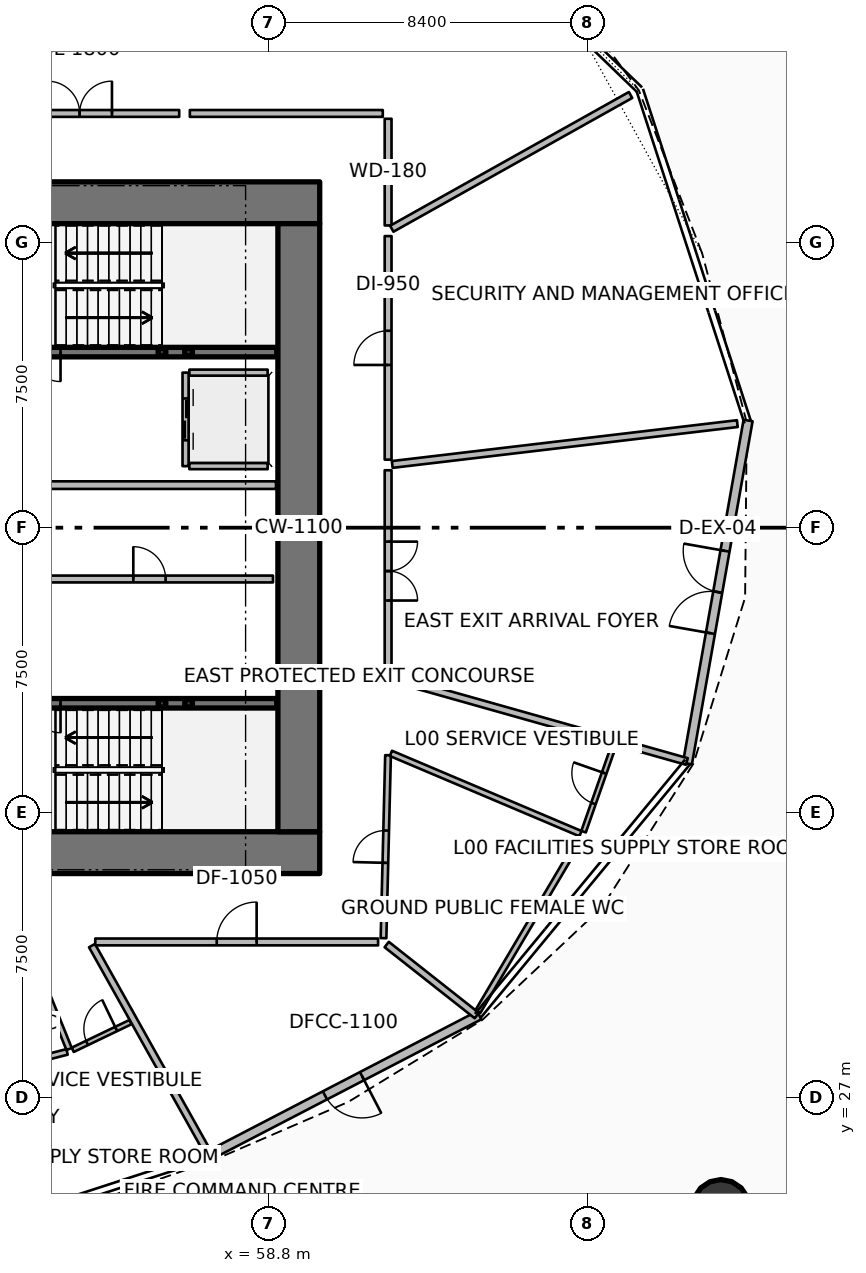
"""IFC4 building model, lengths in metres.
Left out: names, types, materials, properties, quantities, classifications, styles, units other than length and angle.
Written with IfcOpenShell. Run it as: python <this file> out.ifc"""

import sys

from ifc_helpers import new_model, si_unit, direction, frame, frame_2d, origin, origin_2d, place, context, subcontext, project, spatial, rectangle, hollow_rectangle, circle, extrude, element, fill, save


model = new_model("IFC4")
c1 = context("Model", 3, precision=1e-05, world=origin(), true_north=direction((0.0, 1.0)))
c2 = subcontext(c1, "Body", "Model", "MODEL_VIEW")
j1 = project(units=[si_unit("LENGTHUNIT", "METRE"), si_unit("PLANEANGLEUNIT", "RADIAN")], contexts=[c1])
p1 = place(None, origin())
s1 = spatial("IfcSite", under=j1, at=p1, CompositionType="ELEMENT")
p2 = place(p1, origin())
s2 = spatial("IfcBuilding", under=s1, at=p2, CompositionType="ELEMENT")
p3 = place(p2, origin())
s3 = spatial("IfcBuildingStorey", under=s2, at=p3, CompositionType="ELEMENT", Elevation=0.0)
for number, where, z_axis, x_axis in (
    (1, (49.95, 33.45, 0.0), (0.0, 0.0, 1.0), (1.0, 0.0, 0.0)),
    (2, (49.95, 50.55, 0.0), (0.0, 0.0, 1.0), (1.0, 0.0, 0.0)),
):
    element("IfcWall", number, at=place(p3, frame(where, z_axis=z_axis, x_axis=x_axis)), inside=s3, PredefinedType="SHEAR", context=c2, shape_type="SweptSolid", body=[
        extrude(rectangle(XDim=10.2, YDim=1.1, at=frame_2d((5.1, 0.0))), origin(), (0.0, 0.0, 1.0), 7.2),
    ])
p4 = place(p3, frame((59.6, 34.0, 0.0), z_axis=(0.0, 0.0, 1.0), x_axis=(0.0, 1.0, 0.0)))
e3 = element("IfcWall", 3, at=p4, inside=s3, PredefinedType="SHEAR", context=c2, shape_type="SweptSolid", body=[
    extrude(rectangle(XDim=16.0, YDim=1.1, at=frame_2d((8.0, 0.0))), origin(), (0.0, 0.0, 1.0), 7.2),
])
p5 = place(p3, frame((56.0, 46.62, 0.0), z_axis=(0.0, 0.0, 1.0), x_axis=(1.0, 0.0, 0.0)))
e4 = element("IfcColumn", 4, at=p5, inside=s3, PredefinedType="COLUMN", context=c2, shape_type="SweptSolid", body=[
    extrude(hollow_rectangle(XDim=0.2, YDim=0.2, WallThickness=0.01, InnerFilletRadius=0.01, OuterFilletRadius=0.02, at=origin_2d()), origin(), (0.0, 0.0, 1.0), 1.595),
])
p6 = place(p3, frame((56.7, 46.62, 0.0), z_axis=(0.0, 0.0, 1.0), x_axis=(1.0, 0.0, 0.0)))
e5 = element("IfcColumn", 5, at=p6, inside=s3, PredefinedType="COLUMN", context=c2, shape_type="SweptSolid", body=[
    extrude(hollow_rectangle(XDim=0.2, YDim=0.2, WallThickness=0.01, InnerFilletRadius=0.01, OuterFilletRadius=0.02, at=origin_2d()), origin(), (0.0, 0.0, 1.0), 5.195),
])
p7 = place(p3, frame((56.0, 37.38, 0.0), z_axis=(0.0, 0.0, 1.0), x_axis=(1.0, 0.0, 0.0)))
e6 = element("IfcColumn", 6, at=p7, inside=s3, PredefinedType="COLUMN", context=c2, shape_type="SweptSolid", body=[
    extrude(hollow_rectangle(XDim=0.2, YDim=0.2, WallThickness=0.01, InnerFilletRadius=0.01, OuterFilletRadius=0.02, at=origin_2d()), origin(), (0.0, 0.0, 1.0), 1.595),
])
p8 = place(p3, frame((56.7, 37.38, 0.0), z_axis=(0.0, 0.0, 1.0), x_axis=(1.0, 0.0, 0.0)))
e7 = element("IfcColumn", 7, at=p8, inside=s3, PredefinedType="COLUMN", context=c2, shape_type="SweptSolid", body=[
    extrude(hollow_rectangle(XDim=0.2, YDim=0.2, WallThickness=0.01, InnerFilletRadius=0.01, OuterFilletRadius=0.02, at=origin_2d()), origin(), (0.0, 0.0, 1.0), 5.195),
])
p9 = place(p3, frame((70.709, 24.098, 0.0), z_axis=(0.0, 0.0, 1.0), x_axis=(1.0, 0.0, 0.0)))
e8 = element("IfcColumn", 8, at=p9, inside=s3, PredefinedType="COLUMN", context=c2, shape_type="SweptSolid", body=[
    extrude(circle(Radius=0.75, at=origin_2d()), origin(), (0.0, 0.0, 1.0), 6.8),
])
p10 = place(p3, frame((64.348, 29.17, 0.0), z_axis=(0.0, 0.0, 1.0), x_axis=(-0.887579557391, -0.460654457594, 0.0)))
e9 = element("IfcWall", 9, at=p10, inside=s3, PredefinedType="SOLIDWALL", context=c2, shape_type="SweptSolid", body=[
    extrude(rectangle(XDim=8.049, YDim=0.24, at=frame_2d((4.024, 0.0))), origin(), (0.0, 0.0, 1.0), 5.35),
])
p11 = place(p10, frame((3.474, 0.0, 0.0)))
e10 = element("IfcOpeningElement", 10, at=p11, cuts=e9, PredefinedType="OPENING", context=c2, shape_type="SweptSolid", body=[
    extrude(rectangle(XDim=1.1, YDim=2.2, at=frame_2d((0.55, 1.1))), frame((0.0, 0.13, 0.0), z_axis=(0.0, -1.0, 0.0), x_axis=(1.0, 0.0, 0.0)), (0.0, 0.0, 1.0), 0.26),
])
p12 = place(p3, frame((71.422, 44.82, 0.0), z_axis=(0.0, 0.0, 1.0), x_axis=(-0.174163599579, -0.984716731137, 0.0)))
e11 = element("IfcWall", 11, at=p12, inside=s3, PredefinedType="SOLIDWALL", context=c2, shape_type="SweptSolid", body=[
    extrude(rectangle(XDim=9.168, YDim=0.24, at=frame_2d((4.584, 0.0))), origin(), (0.0, 0.0, 1.0), 5.35),
])
p13 = place(p12, frame((3.484, 0.0, 0.0)))
e12 = element("IfcOpeningElement", 12, at=p13, cuts=e11, PredefinedType="OPENING", context=c2, shape_type="SweptSolid", body=[
    extrude(rectangle(XDim=2.2, YDim=2.4, at=frame_2d((1.1, 1.2))), frame((0.0, 0.13, 0.0), z_axis=(0.0, -1.0, 0.0), x_axis=(1.0, 0.0, 0.0)), (0.0, 0.0, 1.0), 0.26),
])
p14 = place(p3, frame((51.48, 46.62, 0.0), z_axis=(0.0, 0.0, 1.0), x_axis=(1.0, 0.0, 0.0)))
e13 = element("IfcWall", 13, at=p14, inside=s3, PredefinedType="SOLIDWALL", context=c2, shape_type="SweptSolid", body=[
    extrude(rectangle(XDim=7.54, YDim=0.25, at=frame_2d((3.77, 0.0))), origin(), (0.0, 0.0, 1.0), 6.8),
])
p15 = place(p14, frame((0.3, 0.0, 0.0)))
e14 = element("IfcOpeningElement", 14, at=p15, cuts=e13, PredefinedType="OPENING", context=c2, shape_type="SweptSolid", body=[
    extrude(rectangle(XDim=1.55, YDim=2.15, at=frame_2d((0.775, 1.075))), frame((0.0, 0.135, 0.0), z_axis=(0.0, -1.0, 0.0), x_axis=(1.0, 0.0, 0.0)), (0.0, 0.0, 1.0), 0.27),
])
p16 = place(p3, frame((51.48, 37.38, 0.0), z_axis=(0.0, 0.0, 1.0), x_axis=(1.0, 0.0, 0.0)))
e15 = element("IfcWall", 15, at=p16, inside=s3, PredefinedType="SOLIDWALL", context=c2, shape_type="SweptSolid", body=[
    extrude(rectangle(XDim=7.54, YDim=0.25, at=frame_2d((3.77, 0.0))), origin(), (0.0, 0.0, 1.0), 6.8),
])
p17 = place(p16, frame((0.3, 0.0, 0.0)))
e16 = element("IfcOpeningElement", 16, at=p17, cuts=e15, PredefinedType="OPENING", context=c2, shape_type="SweptSolid", body=[
    extrude(rectangle(XDim=1.55, YDim=2.15, at=frame_2d((0.775, 1.075))), frame((0.0, 0.135, 0.0), z_axis=(0.0, -1.0, 0.0), x_axis=(1.0, 0.0, 0.0)), (0.0, 0.0, 1.0), 0.27),
])
p18 = place(p3, frame((56.62, 46.08, 0.0), z_axis=(0.0, 0.0, 1.0), x_axis=(0.0, -1.0, 0.0)))
e17 = element("IfcWall", 17, at=p18, inside=s3, PredefinedType="PARTITIONING", context=c2, shape_type="SweptSolid", body=[
    extrude(rectangle(XDim=2.46, YDim=0.16, at=frame_2d((1.23, 0.0))), origin(), (0.0, 0.0, 1.0), 6.8),
])
p19 = place(p18, frame((0.68, 0.0, 0.0)))
e18 = element("IfcOpeningElement", 18, at=p19, cuts=e17, PredefinedType="OPENING", context=c2, shape_type="SweptSolid", body=[
    extrude(rectangle(XDim=1.1, YDim=2.1, at=frame_2d((0.55, 1.05))), frame((0.0, 0.09, 0.0), z_axis=(0.0, -1.0, 0.0), x_axis=(1.0, 0.0, 0.0)), (0.0, 0.0, 1.0), 0.18),
])
for number, where, z_axis, x_axis in (
    (19, (56.72, 46.08, 0.0), (0.0, 0.0, 1.0), (1.0, 0.0, 0.0)),
    (20, (56.72, 43.62, 0.0), (0.0, 0.0, 1.0), (1.0, 0.0, 0.0)),
):
    element("IfcWall", number, at=place(p3, frame(where, z_axis=z_axis, x_axis=x_axis)), inside=s3, PredefinedType="PARTITIONING", context=c2, shape_type="SweptSolid", body=[
        extrude(rectangle(XDim=2.06, YDim=0.16, at=frame_2d((1.03, 0.0))), origin(), (0.0, 0.0, 1.0), 6.8),
    ])
p20 = place(p3, frame((52.42, 40.65, 0.0), z_axis=(0.0, 0.0, 1.0), x_axis=(1.0, 0.0, 0.0)))
e21 = element("IfcWall", 21, at=p20, inside=s3, PredefinedType="PARTITIONING", context=c2, shape_type="SweptSolid", body=[
    extrude(rectangle(XDim=6.5, YDim=0.18, at=frame_2d((3.25, 0.0))), origin(), (0.0, 0.0, 1.0), 6.8),
])
p21 = place(p20, frame((2.825, 0.0, 0.0)))
e22 = element("IfcOpeningElement", 22, at=p21, cuts=e21, PredefinedType="OPENING", context=c2, shape_type="SweptSolid", body=[
    extrude(rectangle(XDim=0.85, YDim=2.06, at=frame_2d((0.425, 1.03))), frame((0.0, 0.1, 0.0), z_axis=(0.0, -1.0, 0.0), x_axis=(1.0, 0.0, 0.0)), (0.0, 0.0, 1.0), 0.2),
])
p22 = place(p3, frame((50.12, 43.12, 0.0), z_axis=(0.0, 0.0, 1.0), x_axis=(1.0, 0.0, 0.0)))
e23 = element("IfcWall", 23, at=p22, inside=s3, PredefinedType="PARTITIONING", context=c2, shape_type="SweptSolid", body=[
    extrude(rectangle(XDim=8.88, YDim=0.2, at=frame_2d((4.44, 0.0))), origin(), (0.0, 0.0, 1.0), 6.8),
])
p23 = place(p3, frame((61.95, 49.952, 0.0), z_axis=(0.0, 0.0, 1.0), x_axis=(0.0, 1.0, 0.0)))
e24 = element("IfcWall", 24, at=p23, inside=s3, PredefinedType="PARTITIONING", context=c2, shape_type="SweptSolid", body=[
    extrude(rectangle(XDim=2.808, YDim=0.18, at=frame_2d((1.404, 0.0))), origin(), (0.0, 0.0, 1.0), 5.375),
])
p24 = place(p3, frame((61.81, 52.9, 0.0), z_axis=(0.0, 0.0, 1.0), x_axis=(-1.0, 0.0, 0.0)))
e25 = element("IfcWall", 25, at=p24, inside=s3, PredefinedType="PARTITIONING", context=c2, shape_type="SweptSolid", body=[
    extrude(rectangle(XDim=5.077, YDim=0.18, at=frame_2d((2.539, 0.0))), origin(), (0.0, 0.0, 1.0), 5.375),
])
p25 = place(p3, frame((56.453, 52.9, 0.0), z_axis=(0.0, 0.0, 1.0), x_axis=(-1.0, 0.0, 0.0)))
e26 = element("IfcWall", 26, at=p25, inside=s3, PredefinedType="PARTITIONING", context=c2, shape_type="SweptSolid", body=[
    extrude(rectangle(XDim=5.239, YDim=0.18, at=frame_2d((2.619, 0.0))), origin(), (0.0, 0.0, 1.0), 5.375),
])
p26 = place(p25, frame((1.769, 0.0, 0.0)))
e27 = element("IfcOpeningElement", 27, at=p26, cuts=e26, PredefinedType="OPENING", context=c2, shape_type="SweptSolid", body=[
    extrude(rectangle(XDim=1.7, YDim=2.15, at=frame_2d((0.85, 1.075))), frame((0.0, 0.1, 0.0), z_axis=(0.0, -1.0, 0.0), x_axis=(1.0, 0.0, 0.0)), (0.0, 0.0, 1.0), 0.2),
])
p27 = place(p3, frame((62.046, 49.866, 0.0), z_axis=(0.0, 0.0, 1.0), x_axis=(0.872497345561, 0.488618851447, 0.0)))
e28 = element("IfcWall", 28, at=p27, inside=s3, PredefinedType="PARTITIONING", context=c2, shape_type="SweptSolid", body=[
    extrude(rectangle(XDim=7.203, YDim=0.18, at=frame_2d((3.601, 0.0))), origin(), (0.0, 0.0, 1.0), 5.375),
])
p28 = place(p3, frame((51.104, 53.006, 0.0), z_axis=(0.0, 0.0, 1.0), x_axis=(0.271432731122, 0.962457413331, 0.0)))
e29 = element("IfcWall", 29, at=p28, inside=s3, PredefinedType="PARTITIONING", context=c2, shape_type="SweptSolid", body=[
    extrude(rectangle(XDim=9.3, YDim=0.18, at=frame_2d((4.65, 0.0))), origin(), (0.0, 0.0, 1.0), 5.375),
])
p29 = place(p3, frame((52.445, 31.026, 0.0), z_axis=(0.0, 0.0, 1.0), x_axis=(0.375383430631, -0.926869613272, 0.0)))
e30 = element("IfcWall", 30, at=p29, inside=s3, PredefinedType="PARTITIONING", context=c2, shape_type="SweptSolid", body=[
    extrude(rectangle(XDim=2.96, YDim=0.15, at=frame_2d((1.48, 0.0))), origin(), (0.0, 0.0, 1.0), 6.24),
])
p30 = place(p3, frame((49.844, 27.268, 0.0), z_axis=(0.0, 0.0, 1.0), x_axis=(0.968578859701, 0.248706639519, 0.0)))
e31 = element("IfcWall", 31, at=p30, inside=s3, PredefinedType="PARTITIONING", context=c2, shape_type="SweptSolid", body=[
    extrude(rectangle(XDim=3.776, YDim=0.15, at=frame_2d((1.888, 0.0))), origin(), (0.0, 0.0, 1.0), 5.757),
])
p31 = place(p3, frame((53.651, 28.261, 0.0), z_axis=(0.0, 0.0, 1.0), x_axis=(0.90143718487, 0.432909923348, 0.0)))
e32 = element("IfcWall", 32, at=p31, inside=s3, PredefinedType="PARTITIONING", context=c2, shape_type="SweptSolid", body=[
    extrude(rectangle(XDim=1.686, YDim=0.125, at=frame_2d((0.843, 0.0))), origin(), (0.0, 0.0, 1.0), 5.757),
])
p32 = place(p31, frame((0.418, 0.0, 0.0)))
e33 = element("IfcOpeningElement", 33, at=p32, cuts=e32, PredefinedType="OPENING", context=c2, shape_type="SweptSolid", body=[
    extrude(rectangle(XDim=0.85, YDim=2.06, at=frame_2d((0.425, 1.03))), frame((0.0, 0.073, 0.0), z_axis=(0.0, -1.0, 0.0), x_axis=(1.0, 0.0, 0.0)), (0.0, 0.0, 1.0), 0.145),
])
p33 = place(p3, frame((54.158, 31.004, 0.0), z_axis=(0.0, 0.0, 1.0), x_axis=(0.488621069092, -0.872496103624, 0.0)))
e34 = element("IfcWall", 34, at=p33, inside=s3, PredefinedType="PARTITIONING", context=c2, shape_type="SweptSolid", body=[
    extrude(rectangle(XDim=6.3, YDim=0.18, at=frame_2d((3.15, 0.0))), origin(), (0.0, 0.0, 1.0), 5.757),
])
p34 = place(p3, frame((54.244, 31.1, 0.0), z_axis=(0.0, 0.0, 1.0), x_axis=(1.0, 0.0, 0.0)))
e35 = element("IfcWall", 35, at=p34, inside=s3, PredefinedType="PARTITIONING", context=c2, shape_type="SweptSolid", body=[
    extrude(rectangle(XDim=7.442, YDim=0.18, at=frame_2d((3.721, 0.0))), origin(), (0.0, 0.0, 1.0), 5.757),
])
p35 = place(p34, frame((3.196, 0.0, 0.0)))
e36 = element("IfcOpeningElement", 36, at=p35, cuts=e35, PredefinedType="OPENING", context=c2, shape_type="SweptSolid", body=[
    extrude(rectangle(XDim=1.05, YDim=2.1, at=frame_2d((0.525, 1.05))), frame((0.0, 0.1, 0.0), z_axis=(0.0, -1.0, 0.0), x_axis=(1.0, 0.0, 0.0)), (0.0, 0.0, 1.0), 0.2),
])
p36 = place(p3, frame((61.913, 31.032, 0.0), z_axis=(0.0, 0.0, 1.0), x_axis=(0.785290333853, -0.619127685988, 0.0)))
e37 = element("IfcWall", 37, at=p36, inside=s3, PredefinedType="PARTITIONING", context=c2, shape_type="SweptSolid", body=[
    extrude(rectangle(XDim=3.019, YDim=0.18, at=frame_2d((1.51, 0.0))), origin(), (0.0, 0.0, 1.0), 5.757),
])
p37 = place(p3, frame((61.829, 31.2, 0.0), z_axis=(0.0, 0.0, 1.0), x_axis=(0.024695722425, 0.999695014139, 0.0)))
e38 = element("IfcWall", 38, at=p37, inside=s3, PredefinedType="PARTITIONING", context=c2, shape_type="SweptSolid", body=[
    extrude(rectangle(XDim=4.814, YDim=0.15, at=frame_2d((2.407, 0.0))), origin(), (0.0, 0.0, 1.0), 5.757),
])
p38 = place(p37, frame((1.982, 0.0, 0.0)))
e39 = element("IfcOpeningElement", 39, at=p38, cuts=e38, PredefinedType="OPENING", context=c2, shape_type="SweptSolid", body=[
    extrude(rectangle(XDim=0.85, YDim=2.06, at=frame_2d((0.425, 1.03))), frame((0.0, 0.085, 0.0), z_axis=(0.0, -1.0, 0.0), x_axis=(1.0, 0.0, 0.0)), (0.0, 0.0, 1.0), 0.17),
])
p39 = place(p3, frame((62.024, 36.062, 0.0), z_axis=(0.0, 0.0, 1.0), x_axis=(0.920852129173, -0.389911985193, 0.0)))
e40 = element("IfcWall", 40, at=p39, inside=s3, PredefinedType="PARTITIONING", context=c2, shape_type="SweptSolid", body=[
    extrude(rectangle(XDim=5.417, YDim=0.15, at=frame_2d((2.708, 0.0))), origin(), (0.0, 0.0, 1.0), 6.24),
])
p40 = place(p3, frame((64.312, 29.267, 0.0), z_axis=(0.0, 0.0, 1.0), x_axis=(0.509025413434, 0.860751490547, 0.0)))
e41 = element("IfcWall", 41, at=p40, inside=s3, PredefinedType="PARTITIONING", context=c2, shape_type="SweptSolid", body=[
    extrude(rectangle(XDim=5.333, YDim=0.15, at=frame_2d((2.667, 0.0))), origin(), (0.0, 0.0, 1.0), 5.757),
])
p41 = place(p3, frame((67.094, 34.002, 0.0), z_axis=(0.0, 0.0, 1.0), x_axis=(0.331379213372, 0.943497650736, 0.0)))
e42 = element("IfcWall", 42, at=p41, inside=s3, PredefinedType="PARTITIONING", context=c2, shape_type="SweptSolid", body=[
    extrude(rectangle(XDim=2.42, YDim=0.125, at=frame_2d((1.21, 0.0))), origin(), (0.0, 0.0, 1.0), 5.375),
])
p42 = place(p41, frame((0.785, 0.0, 0.0)))
e43 = element("IfcOpeningElement", 43, at=p42, cuts=e42, PredefinedType="OPENING", context=c2, shape_type="SweptSolid", body=[
    extrude(rectangle(XDim=0.85, YDim=2.06, at=frame_2d((0.425, 1.03))), frame((0.0, 0.073, 0.0), z_axis=(0.0, -1.0, 0.0), x_axis=(1.0, 0.0, 0.0)), (0.0, 0.0, 1.0), 0.145),
])
p43 = place(p3, frame((62.056, 38.036, 0.0), z_axis=(0.0, 0.0, 1.0), x_axis=(0.962455968479, -0.271437854284, 0.0)))
e44 = element("IfcWall", 44, at=p43, inside=s3, PredefinedType="PARTITIONING", context=c2, shape_type="SweptSolid", body=[
    extrude(rectangle(XDim=8.057, YDim=0.18, at=frame_2d((4.029, 0.0))), origin(), (0.0, 0.0, 1.0), 5.375),
])
p44 = place(p3, frame((61.95, 38.206, 0.0), z_axis=(0.0, 0.0, 1.0), x_axis=(0.0, 1.0, 0.0)))
e45 = element("IfcWall", 45, at=p44, inside=s3, PredefinedType="PARTITIONING", context=c2, shape_type="SweptSolid", body=[
    extrude(rectangle(XDim=5.305, YDim=0.18, at=frame_2d((2.653, 0.0))), origin(), (0.0, 0.0, 1.0), 5.375),
])
p45 = place(p44, frame((1.878, 0.0, 0.0)))
e46 = element("IfcOpeningElement", 46, at=p45, cuts=e45, PredefinedType="OPENING", context=c2, shape_type="SweptSolid", body=[
    extrude(rectangle(XDim=1.55, YDim=2.15, at=frame_2d((0.775, 1.075))), frame((0.0, 0.1, 0.0), z_axis=(0.0, -1.0, 0.0), x_axis=(1.0, 0.0, 0.0)), (0.0, 0.0, 1.0), 0.2),
])
p46 = place(p3, frame((62.059, 43.664, 0.0), z_axis=(0.0, 0.0, 1.0), x_axis=(0.993069080233, 0.11753213129, 0.0)))
e47 = element("IfcWall", 47, at=p46, inside=s3, PredefinedType="PARTITIONING", context=c2, shape_type="SweptSolid", body=[
    extrude(rectangle(XDim=9.144, YDim=0.18, at=frame_2d((4.572, 0.0))), origin(), (0.0, 0.0, 1.0), 5.375),
])
p47 = place(p3, frame((61.95, 43.791, 0.0), z_axis=(0.0, 0.0, 1.0), x_axis=(0.0, 1.0, 0.0)))
e48 = element("IfcWall", 48, at=p47, inside=s3, PredefinedType="PARTITIONING", context=c2, shape_type="SweptSolid", body=[
    extrude(rectangle(XDim=5.881, YDim=0.18, at=frame_2d((2.941, 0.0))), origin(), (0.0, 0.0, 1.0), 5.375),
])
p48 = place(p47, frame((2.491, 0.0, 0.0)))
e49 = element("IfcOpeningElement", 49, at=p48, cuts=e48, PredefinedType="OPENING", context=c2, shape_type="SweptSolid", body=[
    extrude(rectangle(XDim=0.9, YDim=2.08, at=frame_2d((0.45, 1.04))), frame((0.0, 0.1, 0.0), z_axis=(0.0, -1.0, 0.0), x_axis=(1.0, 0.0, 0.0)), (0.0, 0.0, 1.0), 0.2),
])
p49 = place(p11, origin())
e50 = element("IfcDoor", 50, at=p49, inside=s3, OperationType="SINGLE_SWING_LEFT", PredefinedType="DOOR", context=c2, shape_type="SweptSolid", body=[
    extrude(rectangle(XDim=1.1, YDim=2.2, at=frame_2d((0.55, 1.1))), frame((0.0, 0.025, 0.0), z_axis=(0.0, -1.0, 0.0), x_axis=(1.0, 0.0, 0.0)), (0.0, 0.0, 1.0), 0.05),
])
fill(e10, e50)
p50 = place(p13, origin())
e51 = element("IfcDoor", 51, at=p50, inside=s3, OperationType="DOUBLE_DOOR_SINGLE_SWING", PredefinedType="DOOR", context=c2, shape_type="SweptSolid", body=[
    extrude(rectangle(XDim=2.2, YDim=2.4, at=frame_2d((1.1, 1.2))), frame((0.0, 0.025, 0.0), z_axis=(0.0, -1.0, 0.0), x_axis=(1.0, 0.0, 0.0)), (0.0, 0.0, 1.0), 0.05),
])
fill(e12, e51)
p51 = place(p15, origin())
e52 = element("IfcDoor", 52, at=p51, inside=s3, OperationType="DOUBLE_DOOR_SINGLE_SWING", PredefinedType="DOOR", context=c2, shape_type="SweptSolid", body=[
    extrude(rectangle(XDim=1.55, YDim=2.15, at=frame_2d((0.775, 1.075))), frame((0.0, 0.025, 0.0), z_axis=(0.0, -1.0, 0.0), x_axis=(1.0, 0.0, 0.0)), (0.0, 0.0, 1.0), 0.05),
])
fill(e14, e52)
p52 = place(p17, origin())
e53 = element("IfcDoor", 53, at=p52, inside=s3, OperationType="DOUBLE_DOOR_SINGLE_SWING", PredefinedType="DOOR", context=c2, shape_type="SweptSolid", body=[
    extrude(rectangle(XDim=1.55, YDim=2.15, at=frame_2d((0.775, 1.075))), frame((0.0, 0.025, 0.0), z_axis=(0.0, -1.0, 0.0), x_axis=(1.0, 0.0, 0.0)), (0.0, 0.0, 1.0), 0.05),
])
fill(e16, e53)
p53 = place(p19, origin())
e54 = element("IfcDoor", 54, at=p53, inside=s3, OperationType="DOUBLE_DOOR_SLIDING", PredefinedType="DOOR", context=c2, shape_type="SweptSolid", body=[
    extrude(rectangle(XDim=1.1, YDim=2.1, at=frame_2d((0.55, 1.05))), frame((0.0, 0.025, 0.0), z_axis=(0.0, -1.0, 0.0), x_axis=(1.0, 0.0, 0.0)), (0.0, 0.0, 1.0), 0.05),
])
fill(e18, e54)
p54 = place(p21, origin())
e55 = element("IfcDoor", 55, at=p54, inside=s3, OperationType="SINGLE_SWING_LEFT", PredefinedType="DOOR", context=c2, shape_type="SweptSolid", body=[
    extrude(rectangle(XDim=0.85, YDim=2.06, at=frame_2d((0.425, 1.03))), frame((0.0, 0.025, 0.0), z_axis=(0.0, -1.0, 0.0), x_axis=(1.0, 0.0, 0.0)), (0.0, 0.0, 1.0), 0.05),
])
fill(e22, e55)
p55 = place(p26, origin())
e56 = element("IfcDoor", 56, at=p55, inside=s3, OperationType="DOUBLE_DOOR_SINGLE_SWING", PredefinedType="DOOR", context=c2, shape_type="SweptSolid", body=[
    extrude(rectangle(XDim=1.7, YDim=2.15, at=frame_2d((0.85, 1.075))), frame((0.0, 0.025, 0.0), z_axis=(0.0, -1.0, 0.0), x_axis=(1.0, 0.0, 0.0)), (0.0, 0.0, 1.0), 0.05),
])
fill(e27, e56)
p56 = place(p32, origin())
e57 = element("IfcDoor", 57, at=p56, inside=s3, OperationType="SINGLE_SWING_RIGHT", PredefinedType="DOOR", context=c2, shape_type="SweptSolid", body=[
    extrude(rectangle(XDim=0.85, YDim=2.06, at=frame_2d((0.425, 1.03))), frame((0.0, 0.025, 0.0), z_axis=(0.0, -1.0, 0.0), x_axis=(1.0, 0.0, 0.0)), (0.0, 0.0, 1.0), 0.05),
])
fill(e33, e57)
p57 = place(p35, origin())
e58 = element("IfcDoor", 58, at=p57, inside=s3, OperationType="SINGLE_SWING_RIGHT", PredefinedType="DOOR", context=c2, shape_type="SweptSolid", body=[
    extrude(rectangle(XDim=1.05, YDim=2.1, at=frame_2d((0.525, 1.05))), frame((0.0, 0.025, 0.0), z_axis=(0.0, -1.0, 0.0), x_axis=(1.0, 0.0, 0.0)), (0.0, 0.0, 1.0), 0.05),
])
fill(e36, e58)
p58 = place(p38, origin())
e59 = element("IfcDoor", 59, at=p58, inside=s3, OperationType="SINGLE_SWING_LEFT", PredefinedType="DOOR", context=c2, shape_type="SweptSolid", body=[
    extrude(rectangle(XDim=0.85, YDim=2.06, at=frame_2d((0.425, 1.03))), frame((0.0, 0.025, 0.0), z_axis=(0.0, -1.0, 0.0), x_axis=(1.0, 0.0, 0.0)), (0.0, 0.0, 1.0), 0.05),
])
fill(e39, e59)
p59 = place(p42, origin())
e60 = element("IfcDoor", 60, at=p59, inside=s3, OperationType="SINGLE_SWING_RIGHT", PredefinedType="DOOR", context=c2, shape_type="SweptSolid", body=[
    extrude(rectangle(XDim=0.85, YDim=2.06, at=frame_2d((0.425, 1.03))), frame((0.0, 0.025, 0.0), z_axis=(0.0, -1.0, 0.0), x_axis=(1.0, 0.0, 0.0)), (0.0, 0.0, 1.0), 0.05),
])
fill(e43, e60)
p60 = place(p45, origin())
e61 = element("IfcDoor", 61, at=p60, inside=s3, OperationType="DOUBLE_DOOR_SINGLE_SWING", PredefinedType="DOOR", context=c2, shape_type="SweptSolid", body=[
    extrude(rectangle(XDim=1.55, YDim=2.15, at=frame_2d((0.775, 1.075))), frame((0.0, 0.025, 0.0), z_axis=(0.0, -1.0, 0.0), x_axis=(1.0, 0.0, 0.0)), (0.0, 0.0, 1.0), 0.05),
])
fill(e46, e61)
p61 = place(p48, origin())
e62 = element("IfcDoor", 62, at=p61, inside=s3, OperationType="SINGLE_SWING_LEFT", PredefinedType="DOOR", context=c2, shape_type="SweptSolid", body=[
    extrude(rectangle(XDim=0.9, YDim=2.08, at=frame_2d((0.45, 1.04))), frame((0.0, 0.025, 0.0), z_axis=(0.0, -1.0, 0.0), x_axis=(1.0, 0.0, 0.0)), (0.0, 0.0, 1.0), 0.05),
])
fill(e49, e62)
save(model, sys.argv[1])
